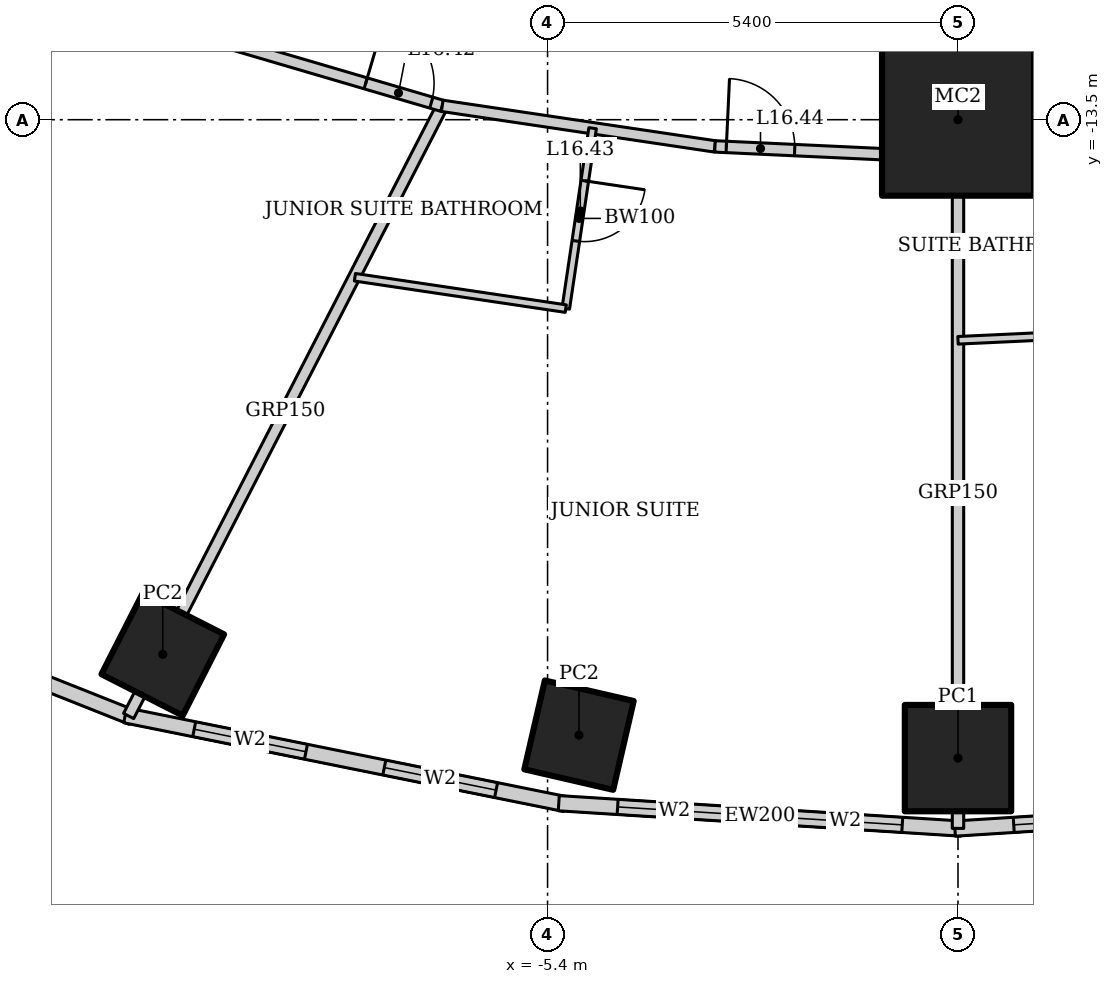
"""IFC4 building model, lengths in metres.
Left out: names, types, materials, properties, quantities, classifications, styles, units other than length and angle.
Written with IfcOpenShell. Run it as: python <this file> out.ifc"""

import sys

from ifc_helpers import new_model, si_unit, direction, frame, frame_2d, origin, origin_2d, place, context, subcontext, project, spatial, rectangle, hollow_rectangle, extrude, element, fill, save


model = new_model("IFC4")
c1 = context("Model", 3, precision=1e-05, world=origin(), true_north=direction((0.0, 1.0)))
c2 = subcontext(c1, "Body", "Model", "MODEL_VIEW")
j1 = project(units=[si_unit("LENGTHUNIT", "METRE"), si_unit("PLANEANGLEUNIT", "RADIAN")], contexts=[c1])
p1 = place(None, origin())
s1 = spatial("IfcSite", under=j1, at=p1, CompositionType="ELEMENT")
p2 = place(p1, origin())
s2 = spatial("IfcBuilding", under=s1, at=p2, CompositionType="ELEMENT")
p3 = place(p2, frame((0.0, 0.0, 73.0)))
s3 = spatial("IfcBuildingStorey", under=s2, at=p3, CompositionType="ELEMENT", Elevation=73.0)
p4 = place(p3, frame((0.0, -13.5, 0.0), z_axis=(0.0, 0.0, 1.0), x_axis=(1.0, 0.0, 0.0)))
e1 = element("IfcColumn", 1, at=p4, inside=s3, PredefinedType="COLUMN", context=c2, shape_type="SweptSolid", body=[
    extrude(hollow_rectangle(XDim=2.0, YDim=2.0, WallThickness=0.17, at=origin_2d()), origin(), (0.0, 0.0, 1.0), 3.6),
])
for number, where, z_axis, x_axis in (
    (2, (-10.463, -20.534, 0.0), (0.0, 0.0, 1.0), (0.454, 0.891, 0.0)),
    (3, (-4.986, -21.598, 0.0), (0.0, 0.0, 1.0), (0.225, 0.974, 0.0)),
):
    element("IfcColumn", number, at=place(p3, frame(where, z_axis=z_axis, x_axis=x_axis)), inside=s3, PredefinedType="COLUMN", context=c2, shape_type="SweptSolid", body=[
        extrude(hollow_rectangle(XDim=1.2, YDim=1.2, WallThickness=0.1, at=origin_2d()), origin(), (0.0, 0.0, 1.0), 3.6),
    ])
p5 = place(p3, frame((0.0, -21.9, 0.0), z_axis=(0.0, 0.0, 1.0), x_axis=(1.0, 0.0, 0.0)))
e4 = element("IfcColumn", 4, at=p5, inside=s3, PredefinedType="COLUMN", context=c2, shape_type="SweptSolid", body=[
    extrude(hollow_rectangle(XDim=1.4, YDim=1.4, WallThickness=0.1, at=origin_2d()), origin(), (0.0, 0.0, 1.0), 3.6),
])
p6 = place(p3, frame((-18.018, -18.523, 0.0), z_axis=(0.0, 0.0, 1.0), x_axis=(0.929358351251, -0.369178892895, 0.0)))
e5 = element("IfcWall", 5, at=p6, inside=s3, PredefinedType="SOLIDWALL", context=c2, shape_type="SweptSolid", body=[
    extrude(rectangle(XDim=7.692, YDim=0.2, at=frame_2d((3.846, 0.0))), origin(), (0.0, 0.0, 1.0), 3.45),
])
p7 = place(p6, frame((1.373, 0.0, 0.5)))
e6 = element("IfcOpeningElement", 6, at=p7, cuts=e5, PredefinedType="OPENING", context=c2, shape_type="SweptSolid", body=[
    extrude(rectangle(XDim=1.5, YDim=2.2, at=frame_2d((0.75, 1.1))), frame((0.0, 0.11, 0.0), z_axis=(0.0, -1.0, 0.0), x_axis=(1.0, 0.0, 0.0)), (0.0, 0.0, 1.0), 0.22),
])
p8 = place(p6, frame((4.819, 0.0, 0.5)))
e7 = element("IfcOpeningElement", 7, at=p8, cuts=e5, PredefinedType="OPENING", context=c2, shape_type="SweptSolid", body=[
    extrude(rectangle(XDim=1.5, YDim=2.2, at=frame_2d((0.75, 1.1))), frame((0.0, 0.11, 0.0), z_axis=(0.0, -1.0, 0.0), x_axis=(1.0, 0.0, 0.0)), (0.0, 0.0, 1.0), 0.22),
])
p9 = place(p3, frame((-10.957, -21.337, 0.0), z_axis=(0.0, 0.0, 1.0), x_axis=(0.980251657452, -0.197754110105, 0.0)))
e8 = element("IfcWall", 8, at=p9, inside=s3, PredefinedType="SOLIDWALL", context=c2, shape_type="SweptSolid", body=[
    extrude(rectangle(XDim=5.904, YDim=0.2, at=frame_2d((2.952, 0.0))), origin(), (0.0, 0.0, 1.0), 3.45),
])
p10 = place(p9, frame((0.926, 0.0, 0.5)))
e9 = element("IfcOpeningElement", 9, at=p10, cuts=e8, PredefinedType="OPENING", context=c2, shape_type="SweptSolid", body=[
    extrude(rectangle(XDim=1.5, YDim=2.2, at=frame_2d((0.75, 1.1))), frame((0.0, 0.11, 0.0), z_axis=(0.0, -1.0, 0.0), x_axis=(1.0, 0.0, 0.0)), (0.0, 0.0, 1.0), 0.22),
])
p11 = place(p9, frame((3.478, 0.0, 0.5)))
e10 = element("IfcOpeningElement", 10, at=p11, cuts=e8, PredefinedType="OPENING", context=c2, shape_type="SweptSolid", body=[
    extrude(rectangle(XDim=1.5, YDim=2.2, at=frame_2d((0.75, 1.1))), frame((0.0, 0.11, 0.0), z_axis=(0.0, -1.0, 0.0), x_axis=(1.0, 0.0, 0.0)), (0.0, 0.0, 1.0), 0.22),
])
p12 = place(p3, frame((-5.253, -22.493, 0.0), z_axis=(0.0, 0.0, 1.0), x_axis=(0.998018582375, -0.062919863585, 0.0)))
e11 = element("IfcWall", 11, at=p12, inside=s3, PredefinedType="SOLIDWALL", context=c2, shape_type="SweptSolid", body=[
    extrude(rectangle(XDim=5.304, YDim=0.2, at=frame_2d((2.652, 0.0))), origin(), (0.0, 0.0, 1.0), 3.45),
])
p13 = place(p12, frame((0.776, 0.0, 0.5)))
e12 = element("IfcOpeningElement", 12, at=p13, cuts=e11, PredefinedType="OPENING", context=c2, shape_type="SweptSolid", body=[
    extrude(rectangle(XDim=1.5, YDim=2.2, at=frame_2d((0.75, 1.1))), frame((0.0, 0.11, 0.0), z_axis=(0.0, -1.0, 0.0), x_axis=(1.0, 0.0, 0.0)), (0.0, 0.0, 1.0), 0.22),
])
p14 = place(p12, frame((3.028, 0.0, 0.5)))
e13 = element("IfcOpeningElement", 13, at=p14, cuts=e11, PredefinedType="OPENING", context=c2, shape_type="SweptSolid", body=[
    extrude(rectangle(XDim=1.5, YDim=2.2, at=frame_2d((0.75, 1.1))), frame((0.0, 0.11, 0.0), z_axis=(0.0, -1.0, 0.0), x_axis=(1.0, 0.0, 0.0)), (0.0, 0.0, 1.0), 0.22),
])
p15 = place(p3, frame((-0.041, -22.827, 0.0), z_axis=(0.0, 0.0, 1.0), x_axis=(0.998018582375, 0.062919863585, 0.0)))
e14 = element("IfcWall", 14, at=p15, inside=s3, PredefinedType="SOLIDWALL", context=c2, shape_type="SweptSolid", body=[
    extrude(rectangle(XDim=5.304, YDim=0.2, at=frame_2d((2.652, 0.0))), origin(), (0.0, 0.0, 1.0), 3.45),
])
p16 = place(p15, frame((0.776, 0.0, 0.5)))
e15 = element("IfcOpeningElement", 15, at=p16, cuts=e14, PredefinedType="OPENING", context=c2, shape_type="SweptSolid", body=[
    extrude(rectangle(XDim=1.5, YDim=2.2, at=frame_2d((0.75, 1.1))), frame((0.0, 0.11, 0.0), z_axis=(0.0, -1.0, 0.0), x_axis=(1.0, 0.0, 0.0)), (0.0, 0.0, 1.0), 0.22),
])
p17 = place(p15, frame((3.028, 0.0, 0.5)))
e16 = element("IfcOpeningElement", 16, at=p17, cuts=e14, PredefinedType="OPENING", context=c2, shape_type="SweptSolid", body=[
    extrude(rectangle(XDim=1.5, YDim=2.2, at=frame_2d((0.75, 1.1))), frame((0.0, 0.11, 0.0), z_axis=(0.0, -1.0, 0.0), x_axis=(1.0, 0.0, 0.0)), (0.0, 0.0, 1.0), 0.22),
])
p18 = place(p3, frame((-10.912, -21.346, 0.0), z_axis=(0.0, 0.0, 1.0), x_axis=(0.457117602022, 0.889406261458, 0.0)))
e17 = element("IfcWall", 17, at=p18, inside=s3, PredefinedType="PARTITIONING", context=c2, shape_type="SweptSolid", body=[
    extrude(rectangle(XDim=9.027, YDim=0.15, at=frame_2d((4.513, 0.0))), origin(), (0.0, 0.0, 1.0), 2.528),
])
p19 = place(p3, frame((0.0, -22.825, 0.0), z_axis=(0.0, 0.0, 1.0), x_axis=(0.0, 1.0, 0.0)))
e18 = element("IfcWall", 18, at=p19, inside=s3, PredefinedType="PARTITIONING", context=c2, shape_type="SweptSolid", body=[
    extrude(rectangle(XDim=8.825, YDim=0.15, at=frame_2d((4.412, 0.0))), origin(), (0.0, 0.0, 1.0), 2.924),
])
p20 = place(p3, frame((-11.519, -11.928, 0.0), z_axis=(0.0, 0.0, 1.0), x_axis=(0.959496227294, -0.281721475589, 0.0)))
e19 = element("IfcWall", 19, at=p20, inside=s3, PredefinedType="PARTITIONING", context=c2, shape_type="SweptSolid", body=[
    extrude(rectangle(XDim=4.933, YDim=0.15, at=frame_2d((2.466, 0.0))), origin(), (0.0, 0.0, 1.0), 3.45),
])
p21 = place(p20, frame((3.883, 0.0, 0.0)))
e20 = element("IfcOpeningElement", 20, at=p21, cuts=e19, PredefinedType="OPENING", context=c2, shape_type="SweptSolid", body=[
    extrude(rectangle(XDim=0.9, YDim=2.1, at=frame_2d((0.45, 1.05))), frame((0.0, 0.085, 0.0), z_axis=(0.0, -1.0, 0.0), x_axis=(1.0, 0.0, 0.0)), (0.0, 0.0, 1.0), 0.17),
])
p22 = place(p3, frame((-6.786, -13.317, 0.0), z_axis=(0.0, 0.0, 1.0), x_axis=(0.989107488999, -0.14719502439, 0.0)))
e21 = element("IfcWall", 21, at=p22, inside=s3, PredefinedType="PARTITIONING", context=c2, shape_type="SweptSolid", body=[
    extrude(rectangle(XDim=3.627, YDim=0.15, at=frame_2d((1.814, 0.0))), origin(), (0.0, 0.0, 1.0), 3.45),
])
p23 = place(p3, frame((-3.198, -13.851, 0.0), z_axis=(0.0, 0.0, 1.0), x_axis=(0.998920826789, -0.046445471333, 0.0)))
e22 = element("IfcWall", 22, at=p23, inside=s3, PredefinedType="PARTITIONING", context=c2, shape_type="SweptSolid", body=[
    extrude(rectangle(XDim=3.201, YDim=0.15, at=frame_2d((1.601, 0.0))), origin(), (0.0, 0.0, 1.0), 3.45),
])
p24 = place(p23, frame((0.15, 0.0, 0.0)))
e23 = element("IfcOpeningElement", 23, at=p24, cuts=e22, PredefinedType="OPENING", context=c2, shape_type="SweptSolid", body=[
    extrude(rectangle(XDim=0.9, YDim=2.1, at=frame_2d((0.45, 1.05))), frame((0.0, 0.085, 0.0), z_axis=(0.0, -1.0, 0.0), x_axis=(1.0, 0.0, 0.0)), (0.0, 0.0, 1.0), 0.17),
])
p25 = place(p3, frame((0.0, -14.0, 0.0), z_axis=(0.0, 0.0, 1.0), x_axis=(0.998920826789, 0.046445471333, 0.0)))
e24 = element("IfcWall", 24, at=p25, inside=s3, PredefinedType="PARTITIONING", context=c2, shape_type="SweptSolid", body=[
    extrude(rectangle(XDim=3.201, YDim=0.15, at=frame_2d((1.601, 0.0))), origin(), (0.0, 0.0, 1.0), 3.45),
])
p26 = place(p3, frame((-4.807, -13.612, 0.0), z_axis=(0.0, 0.0, 1.0), x_axis=(-0.147201193874, -0.989106570862, 0.0)))
e25 = element("IfcWall", 25, at=p26, inside=s3, PredefinedType="PARTITIONING", context=c2, shape_type="SweptSolid", body=[
    extrude(rectangle(XDim=2.4, YDim=0.1, at=frame_2d((1.2, 0.0))), origin(), (0.0, 0.0, 1.0), 3.45),
])
p27 = place(p26, frame((0.7, 0.0, 0.0)))
e26 = element("IfcOpeningElement", 26, at=p27, cuts=e25, PredefinedType="OPENING", context=c2, shape_type="SweptSolid", body=[
    extrude(rectangle(XDim=0.8, YDim=2.1, at=frame_2d((0.4, 1.05))), frame((0.0, 0.06, 0.0), z_axis=(0.0, -1.0, 0.0), x_axis=(1.0, 0.0, 0.0)), (0.0, 0.0, 1.0), 0.12),
])
p28 = place(p3, frame((-5.161, -15.986, 0.0), z_axis=(0.0, 0.0, 1.0), x_axis=(-0.98910744157, 0.147195343104, 0.0)))
e27 = element("IfcWall", 27, at=p28, inside=s3, PredefinedType="PARTITIONING", context=c2, shape_type="SweptSolid", body=[
    extrude(rectangle(XDim=2.805, YDim=0.1, at=frame_2d((1.402, 0.0))), origin(), (0.0, 0.0, 1.0), 3.45),
])
p29 = place(p3, frame((2.109, -16.304, 0.0), z_axis=(0.0, 0.0, 1.0), x_axis=(-0.998919337223, -0.04647749694, 0.0)))
e28 = element("IfcWall", 28, at=p29, inside=s3, PredefinedType="PARTITIONING", context=c2, shape_type="SweptSolid", body=[
    extrude(rectangle(XDim=2.112, YDim=0.1, at=frame_2d((1.056, 0.0))), origin(), (0.0, 0.0, 1.0), 3.45),
])
p30 = place(p10, origin())
e29 = element("IfcWindow", 29, at=p30, inside=s3, PartitioningType="SINGLE_PANEL", PredefinedType="WINDOW", context=c2, shape_type="SweptSolid", body=[
    extrude(rectangle(XDim=1.5, YDim=2.2, at=frame_2d((0.75, 1.1))), frame((0.0, 0.03, 0.0), z_axis=(0.0, -1.0, 0.0), x_axis=(1.0, 0.0, 0.0)), (0.0, 0.0, 1.0), 0.06),
])
fill(e9, e29)
p31 = place(p11, origin())
e30 = element("IfcWindow", 30, at=p31, inside=s3, PartitioningType="SINGLE_PANEL", PredefinedType="WINDOW", context=c2, shape_type="SweptSolid", body=[
    extrude(rectangle(XDim=1.5, YDim=2.2, at=frame_2d((0.75, 1.1))), frame((0.0, 0.03, 0.0), z_axis=(0.0, -1.0, 0.0), x_axis=(1.0, 0.0, 0.0)), (0.0, 0.0, 1.0), 0.06),
])
fill(e10, e30)
p32 = place(p13, origin())
e31 = element("IfcWindow", 31, at=p32, inside=s3, PartitioningType="SINGLE_PANEL", PredefinedType="WINDOW", context=c2, shape_type="SweptSolid", body=[
    extrude(rectangle(XDim=1.5, YDim=2.2, at=frame_2d((0.75, 1.1))), frame((0.0, 0.03, 0.0), z_axis=(0.0, -1.0, 0.0), x_axis=(1.0, 0.0, 0.0)), (0.0, 0.0, 1.0), 0.06),
])
fill(e12, e31)
p33 = place(p14, origin())
e32 = element("IfcWindow", 32, at=p33, inside=s3, PartitioningType="SINGLE_PANEL", PredefinedType="WINDOW", context=c2, shape_type="SweptSolid", body=[
    extrude(rectangle(XDim=1.5, YDim=2.2, at=frame_2d((0.75, 1.1))), frame((0.0, 0.03, 0.0), z_axis=(0.0, -1.0, 0.0), x_axis=(1.0, 0.0, 0.0)), (0.0, 0.0, 1.0), 0.06),
])
fill(e13, e32)
p34 = place(p16, origin())
e33 = element("IfcWindow", 33, at=p34, inside=s3, PartitioningType="SINGLE_PANEL", PredefinedType="WINDOW", context=c2, shape_type="SweptSolid", body=[
    extrude(rectangle(XDim=1.5, YDim=2.2, at=frame_2d((0.75, 1.1))), frame((0.0, 0.03, 0.0), z_axis=(0.0, -1.0, 0.0), x_axis=(1.0, 0.0, 0.0)), (0.0, 0.0, 1.0), 0.06),
])
fill(e15, e33)
p35 = place(p21, origin())
e34 = element("IfcDoor", 34, at=p35, inside=s3, OperationType="SINGLE_SWING_LEFT", PredefinedType="DOOR", context=c2, shape_type="SweptSolid", body=[
    extrude(rectangle(XDim=0.9, YDim=2.1, at=frame_2d((0.45, 1.05))), frame((0.0, 0.025, 0.0), z_axis=(0.0, -1.0, 0.0), x_axis=(1.0, 0.0, 0.0)), (0.0, 0.0, 1.0), 0.05),
])
fill(e20, e34)
p36 = place(p27, origin())
e35 = element("IfcDoor", 35, at=p36, inside=s3, OperationType="SINGLE_SWING_LEFT", PredefinedType="DOOR", context=c2, shape_type="SweptSolid", body=[
    extrude(rectangle(XDim=0.8, YDim=2.1, at=frame_2d((0.4, 1.05))), frame((0.0, 0.025, 0.0), z_axis=(0.0, -1.0, 0.0), x_axis=(1.0, 0.0, 0.0)), (0.0, 0.0, 1.0), 0.05),
])
fill(e26, e35)
p37 = place(p24, origin())
e36 = element("IfcDoor", 36, at=p37, inside=s3, OperationType="SINGLE_SWING_LEFT", PredefinedType="DOOR", context=c2, shape_type="SweptSolid", body=[
    extrude(rectangle(XDim=0.9, YDim=2.1, at=frame_2d((0.45, 1.05))), frame((0.0, 0.025, 0.0), z_axis=(0.0, -1.0, 0.0), x_axis=(1.0, 0.0, 0.0)), (0.0, 0.0, 1.0), 0.05),
])
fill(e23, e36)
save(model, sys.argv[1])
